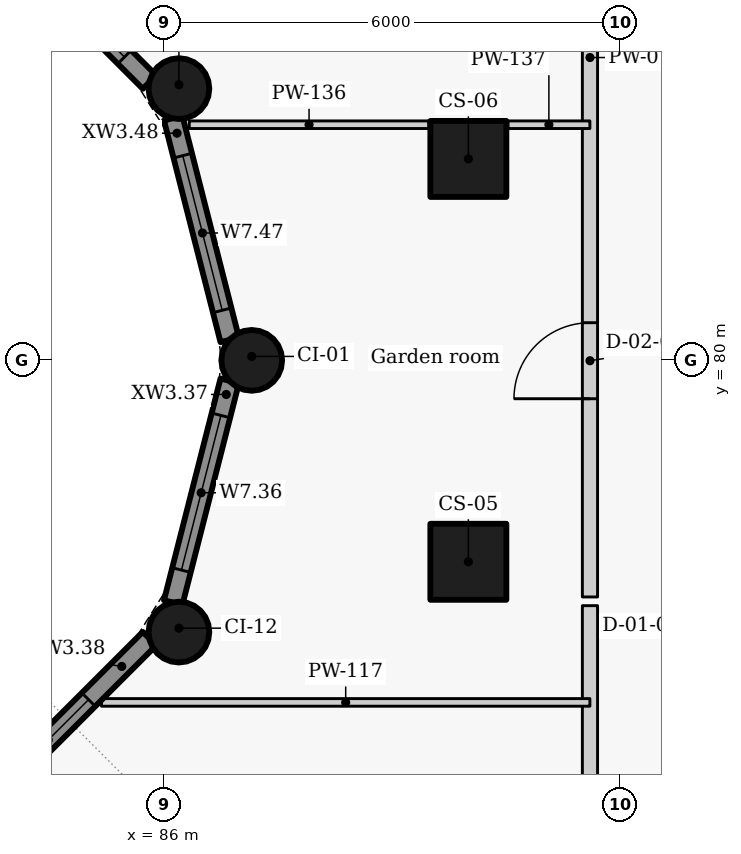
"""IFC4 building model, lengths in metres.
Left out: names, types, materials, properties, quantities, classifications, styles, units other than length and angle.
Written with IfcOpenShell. Run it as: python <this file> out.ifc"""

import sys

from ifc_helpers import new_model, si_unit, direction, frame, frame_2d, origin, origin_2d, place, context, subcontext, project, spatial, rectangle, circle, extrude, element, fill, save


model = new_model("IFC4")
c1 = context("Model", 3, precision=1e-05, world=origin(), true_north=direction((0.0, 1.0)))
c2 = subcontext(c1, "Body", "Model", "MODEL_VIEW")
j1 = project(units=[si_unit("LENGTHUNIT", "METRE"), si_unit("PLANEANGLEUNIT", "RADIAN")], contexts=[c1])
p1 = place(None, origin())
s1 = spatial("IfcSite", under=j1, at=p1, CompositionType="ELEMENT")
p2 = place(p1, origin())
s2 = spatial("IfcBuilding", under=s1, at=p2, CompositionType="ELEMENT")
p3 = place(p2, frame((0.0, 0.0, 140.4)))
s3 = spatial("IfcBuildingStorey", under=s2, at=p3, CompositionType="ELEMENT", Elevation=140.4)
for number, where, z_axis, x_axis in (
    (1, (90.0, 77.35, 0.0), (0.0, 0.0, 1.0), (0.0, 1.0, 0.0)),
    (2, (90.0, 82.65, 0.0), (0.0, 0.0, 1.0), (0.0, 1.0, 0.0)),
):
    element("IfcColumn", number, at=place(p3, frame(where, z_axis=z_axis, x_axis=x_axis)), inside=s3, PredefinedType="COLUMN", context=c2, shape_type="SweptSolid", body=[
        extrude(rectangle(XDim=1.0, YDim=1.0, at=origin_2d()), origin(), (0.0, 0.0, 1.0), 3.3),
    ])
for number, where, z_axis, x_axis in (
    (3, (87.15, 80.0, 0.0), (0.0, 0.0, 1.0), (0.0, 1.0, 0.0)),
    (4, (86.192, 83.575, 0.0), (0.0, 0.0, 1.0), (-0.5, 0.866, 0.0)),
    (5, (86.192, 76.425, 0.0), (0.0, 0.0, 1.0), (0.5, 0.866, 0.0)),
):
    element("IfcColumn", number, at=place(p3, frame(where, z_axis=z_axis, x_axis=x_axis)), inside=s3, PredefinedType="COLUMN", context=c2, shape_type="SweptSolid", body=[
        extrude(circle(Radius=0.4, at=origin_2d()), origin(), (0.0, 0.0, 1.0), 3.3),
    ])
p4 = place(p3, frame((86.86, 79.73, 0.0), z_axis=(0.0, 0.0, 1.0), x_axis=(-0.247055971283, -0.969001211069, 0.0)))
e6 = element("IfcWall", 6, at=p4, inside=s3, PredefinedType="SOLIDWALL", context=c2, shape_type="SweptSolid", body=[
    extrude(rectangle(XDim=3.01, YDim=0.25, at=frame_2d((1.505, 0.0))), origin(), (0.0, 0.0, 1.0), 2.425),
])
p5 = place(p4, frame((0.469, 0.0, 0.9)))
e7 = element("IfcOpeningElement", 7, at=p5, cuts=e6, PredefinedType="OPENING", context=c2, shape_type="SweptSolid", body=[
    extrude(rectangle(XDim=2.1, YDim=1.1, at=frame_2d((1.05, 0.55))), frame((0.0, 0.135, 0.0), z_axis=(0.0, -1.0, 0.0), x_axis=(1.0, 0.0, 0.0)), (0.0, 0.0, 1.0), 0.27),
])
p6 = place(p3, frame((85.806, 76.339, 0.0), z_axis=(0.0, 0.0, 1.0), x_axis=(-0.707106781187, -0.707106781187, 0.0)))
e8 = element("IfcWall", 8, at=p6, inside=s3, PredefinedType="SOLIDWALL", context=c2, shape_type="SweptSolid", body=[
    extrude(rectangle(XDim=3.033, YDim=0.25, at=frame_2d((1.517, 0.0))), origin(), (0.0, 0.0, 1.0), 2.425),
])
p7 = place(p6, frame((1.134, 0.0, 0.9)))
e9 = element("IfcOpeningElement", 9, at=p7, cuts=e8, PredefinedType="OPENING", context=c2, shape_type="SweptSolid", body=[
    extrude(rectangle(XDim=1.5, YDim=1.1, at=frame_2d((0.75, 0.55))), frame((0.0, 0.135, 0.0), z_axis=(0.0, -1.0, 0.0), x_axis=(1.0, 0.0, 0.0)), (0.0, 0.0, 1.0), 0.27),
])
p8 = place(p3, frame((83.661, 85.806, 0.0), z_axis=(0.0, 0.0, 1.0), x_axis=(0.707106781187, -0.707106781187, 0.0)))
e10 = element("IfcWall", 10, at=p8, inside=s3, PredefinedType="SOLIDWALL", context=c2, shape_type="SweptSolid", body=[
    extrude(rectangle(XDim=3.033, YDim=0.25, at=frame_2d((1.517, 0.0))), origin(), (0.0, 0.0, 1.0), 2.425),
])
p9 = place(p8, frame((0.467, 0.0, 0.9)))
e11 = element("IfcOpeningElement", 11, at=p9, cuts=e10, PredefinedType="OPENING", context=c2, shape_type="SweptSolid", body=[
    extrude(rectangle(XDim=2.1, YDim=1.1, at=frame_2d((1.05, 0.55))), frame((0.0, 0.135, 0.0), z_axis=(0.0, -1.0, 0.0), x_axis=(1.0, 0.0, 0.0)), (0.0, 0.0, 1.0), 0.27),
])
p10 = place(p3, frame((86.117, 83.187, 0.0), z_axis=(0.0, 0.0, 1.0), x_axis=(0.247055971283, -0.969001211069, 0.0)))
e12 = element("IfcWall", 12, at=p10, inside=s3, PredefinedType="SOLIDWALL", context=c2, shape_type="SweptSolid", body=[
    extrude(rectangle(XDim=3.01, YDim=0.25, at=frame_2d((1.505, 0.0))), origin(), (0.0, 0.0, 1.0), 2.425),
])
p11 = place(p10, frame((0.51, 0.0, 0.9)))
e13 = element("IfcOpeningElement", 13, at=p11, cuts=e12, PredefinedType="OPENING", context=c2, shape_type="SweptSolid", body=[
    extrude(rectangle(XDim=2.1, YDim=1.1, at=frame_2d((1.05, 0.55))), frame((0.0, 0.135, 0.0), z_axis=(0.0, -1.0, 0.0), x_axis=(1.0, 0.0, 0.0)), (0.0, 0.0, 1.0), 0.27),
])
p12 = place(p3, frame((91.6, 71.587, 0.0), z_axis=(0.0, 0.0, 1.0), x_axis=(0.0, 1.0, 0.0)))
e14 = element("IfcWall", 14, at=p12, inside=s3, PredefinedType="PARTITIONING", context=c2, shape_type="SweptSolid", body=[
    extrude(rectangle(XDim=5.186, YDim=0.2, at=frame_2d((2.593, 0.0))), origin(), (0.0, 0.0, 1.0), 3.025),
])
p13 = place(p3, frame((91.6, 76.887, 0.0), z_axis=(0.0, 0.0, 1.0), x_axis=(0.0, 1.0, 0.0)))
e15 = element("IfcWall", 15, at=p13, inside=s3, PredefinedType="PARTITIONING", context=c2, shape_type="SweptSolid", body=[
    extrude(rectangle(XDim=10.486, YDim=0.2, at=frame_2d((5.243, 0.0))), origin(), (0.0, 0.0, 1.0), 3.025),
])
p14 = place(p13, frame((2.608, 0.0, 0.0)))
e16 = element("IfcOpeningElement", 16, at=p14, cuts=e15, PredefinedType="OPENING", context=c2, shape_type="SweptSolid", body=[
    extrude(rectangle(XDim=1.0, YDim=2.1, at=frame_2d((0.5, 1.05))), frame((0.0, 0.11, 0.0), z_axis=(0.0, -1.0, 0.0), x_axis=(1.0, 0.0, 0.0)), (0.0, 0.0, 1.0), 0.22),
])
p15 = place(p3, frame((85.173, 75.5, 0.0), z_axis=(0.0, 0.0, 1.0), x_axis=(1.0, 0.0, 0.0)))
e17 = element("IfcWall", 17, at=p15, inside=s3, PredefinedType="PARTITIONING", context=c2, shape_type="SweptSolid", body=[
    extrude(rectangle(XDim=6.426, YDim=0.1, at=frame_2d((3.213, 0.0))), origin(), (0.0, 0.0, 1.0), 2.505),
])
p16 = place(p3, frame((86.328, 83.1, 0.0), z_axis=(0.0, 0.0, 1.0), x_axis=(1.0, 0.0, 0.0)))
e18 = element("IfcWall", 18, at=p16, inside=s3, PredefinedType="PARTITIONING", context=c2, shape_type="SweptSolid", body=[
    extrude(rectangle(XDim=3.152, YDim=0.1, at=frame_2d((1.576, 0.0))), origin(), (0.0, 0.0, 1.0), 3.025),
])
p17 = place(p3, frame((90.52, 83.1, 0.0), z_axis=(0.0, 0.0, 1.0), x_axis=(1.0, 0.0, 0.0)))
e19 = element("IfcWall", 19, at=p17, inside=s3, PredefinedType="PARTITIONING", context=c2, shape_type="SweptSolid", body=[
    extrude(rectangle(XDim=1.079, YDim=0.1, at=frame_2d((0.54, 0.0))), origin(), (0.0, 0.0, 1.0), 3.025),
])
p18 = place(p5, origin())
e20 = element("IfcWindow", 20, at=p18, inside=s3, PartitioningType="SINGLE_PANEL", PredefinedType="WINDOW", context=c2, shape_type="SweptSolid", body=[
    extrude(rectangle(XDim=2.1, YDim=1.1, at=frame_2d((1.05, 0.55))), frame((0.0, 0.03, 0.0), z_axis=(0.0, -1.0, 0.0), x_axis=(1.0, 0.0, 0.0)), (0.0, 0.0, 1.0), 0.06),
])
fill(e7, e20)
p19 = place(p7, origin())
e21 = element("IfcWindow", 21, at=p19, inside=s3, PartitioningType="SINGLE_PANEL", PredefinedType="WINDOW", context=c2, shape_type="SweptSolid", body=[
    extrude(rectangle(XDim=1.5, YDim=1.1, at=frame_2d((0.75, 0.55))), frame((0.0, 0.03, 0.0), z_axis=(0.0, -1.0, 0.0), x_axis=(1.0, 0.0, 0.0)), (0.0, 0.0, 1.0), 0.06),
])
fill(e9, e21)
p20 = place(p9, origin())
e22 = element("IfcWindow", 22, at=p20, inside=s3, PartitioningType="SINGLE_PANEL", PredefinedType="WINDOW", context=c2, shape_type="SweptSolid", body=[
    extrude(rectangle(XDim=2.1, YDim=1.1, at=frame_2d((1.05, 0.55))), frame((0.0, 0.03, 0.0), z_axis=(0.0, -1.0, 0.0), x_axis=(1.0, 0.0, 0.0)), (0.0, 0.0, 1.0), 0.06),
])
fill(e11, e22)
p21 = place(p11, origin())
e23 = element("IfcWindow", 23, at=p21, inside=s3, PartitioningType="SINGLE_PANEL", PredefinedType="WINDOW", context=c2, shape_type="SweptSolid", body=[
    extrude(rectangle(XDim=2.1, YDim=1.1, at=frame_2d((1.05, 0.55))), frame((0.0, 0.03, 0.0), z_axis=(0.0, -1.0, 0.0), x_axis=(1.0, 0.0, 0.0)), (0.0, 0.0, 1.0), 0.06),
])
fill(e13, e23)
p22 = place(p14, origin())
e24 = element("IfcDoor", 24, at=p22, inside=s3, OperationType="SINGLE_SWING_LEFT", PredefinedType="DOOR", context=c2, shape_type="SweptSolid", body=[
    extrude(rectangle(XDim=1.0, YDim=2.1, at=frame_2d((0.5, 1.05))), frame((0.0, 0.025, 0.0), z_axis=(0.0, -1.0, 0.0), x_axis=(1.0, 0.0, 0.0)), (0.0, 0.0, 1.0), 0.05),
])
fill(e16, e24)
save(model, sys.argv[1])
